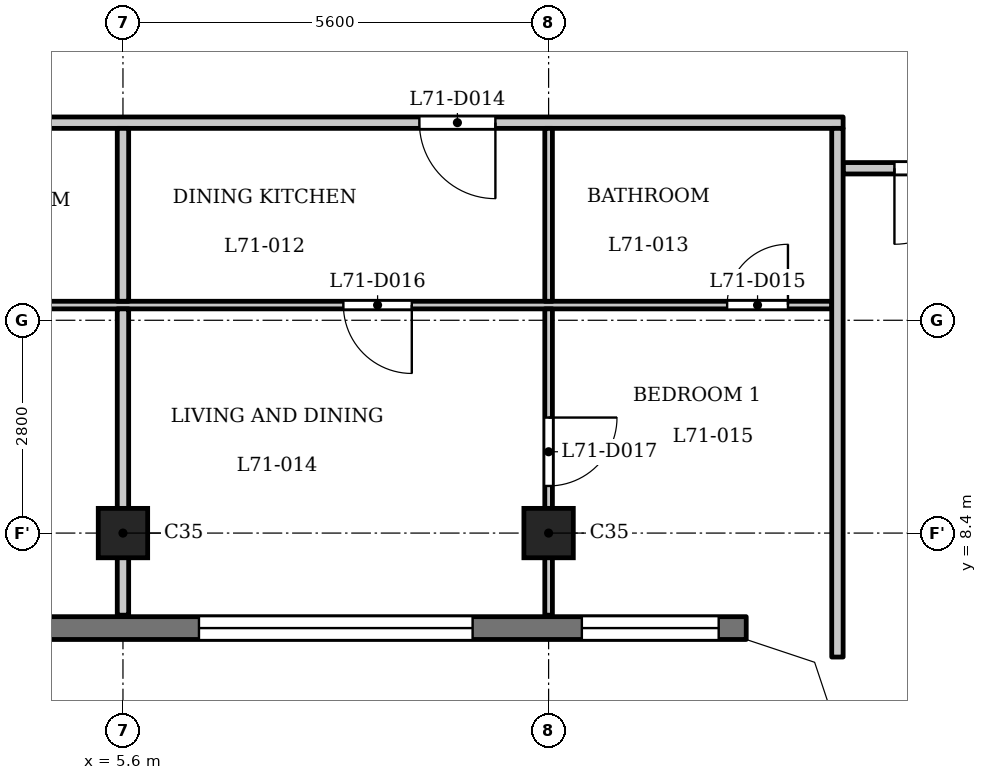
"""IFC4 building model, lengths in metres.
Left out: names, types, materials, properties, quantities, classifications, styles, units other than length and angle.
Written with IfcOpenShell. Run it as: python <this file> out.ifc"""

import sys

from ifc_helpers import new_model, si_unit, direction, frame, frame_2d, origin, origin_2d, place, context, subcontext, project, spatial, polyline, rectangle, outline, extrude, element, fill, save


model = new_model("IFC4")
c1 = context("Model", 3, precision=1e-05, world=origin(), true_north=direction((0.0, 1.0)))
c2 = subcontext(c1, "Body", "Model", "MODEL_VIEW")
j1 = project(units=[si_unit("LENGTHUNIT", "METRE"), si_unit("PLANEANGLEUNIT", "RADIAN")], contexts=[c1])
p1 = place(None, origin())
s1 = spatial("IfcSite", under=j1, at=p1, CompositionType="ELEMENT")
p2 = place(p1, origin())
s2 = spatial("IfcBuilding", under=s1, at=p2, CompositionType="ELEMENT")
p3 = place(p2, frame((0.0, 0.0, 273.2)))
s3 = spatial("IfcBuildingStorey", under=s2, at=p3, CompositionType="ELEMENT", Elevation=273.2)
for number, where, z_axis, x_axis in (
    (1, (5.6, 8.4, 0.0), (0.0, 0.0, 1.0), (1.0, 0.0, 0.0)),
    (2, (11.2, 8.4, 0.0), (0.0, 0.0, 1.0), (1.0, 0.0, 0.0)),
):
    element("IfcColumn", number, at=place(p3, frame(where, z_axis=z_axis, x_axis=x_axis)), inside=s3, PredefinedType="COLUMN", context=c2, shape_type="SweptSolid", body=[
        extrude(rectangle(XDim=0.65, YDim=0.65, at=origin_2d()), origin(), (0.0, 0.0, 1.0), 3.5),
    ])
p4 = place(p3, frame((-13.8, 7.15, 0.0), z_axis=(0.0, 0.0, 1.0), x_axis=(1.0, 0.0, 0.0)))
e3 = element("IfcWall", 3, at=p4, inside=s3, PredefinedType="SOLIDWALL", context=c2, shape_type="SweptSolid", body=[
    extrude(rectangle(XDim=27.6, YDim=0.3, at=frame_2d((13.8, 0.0))), origin(), (0.0, 0.0, 1.0), 3.2),
])
p5 = place(p4, frame((0.363, 0.0, 0.9)))
e4 = element("IfcOpeningElement", 4, at=p5, cuts=e3, PredefinedType="OPENING", context=c2, shape_type="SweptSolid", body=[
    extrude(rectangle(XDim=1.8, YDim=1.25, at=frame_2d((0.9, 0.625))), frame((0.0, 0.16, 0.0), z_axis=(0.0, -1.0, 0.0), x_axis=(1.0, 0.0, 0.0)), (0.0, 0.0, 1.0), 0.32),
])
p6 = place(p4, frame((3.6, 0.0, 1.2)))
e5 = element("IfcOpeningElement", 5, at=p6, cuts=e3, PredefinedType="OPENING", context=c2, shape_type="SweptSolid", body=[
    extrude(rectangle(XDim=3.6, YDim=0.95, at=frame_2d((1.8, 0.475))), frame((0.0, 0.16, 0.0), z_axis=(0.0, -1.0, 0.0), x_axis=(1.0, 0.0, 0.0)), (0.0, 0.0, 1.0), 0.32),
])
p7 = place(p4, frame((9.2, 0.0, 1.2)))
e6 = element("IfcOpeningElement", 6, at=p7, cuts=e3, PredefinedType="OPENING", context=c2, shape_type="SweptSolid", body=[
    extrude(rectangle(XDim=3.6, YDim=0.95, at=frame_2d((1.8, 0.475))), frame((0.0, 0.16, 0.0), z_axis=(0.0, -1.0, 0.0), x_axis=(1.0, 0.0, 0.0)), (0.0, 0.0, 1.0), 0.32),
])
p8 = place(p4, frame((14.8, 0.0, 1.2)))
e7 = element("IfcOpeningElement", 7, at=p8, cuts=e3, PredefinedType="OPENING", context=c2, shape_type="SweptSolid", body=[
    extrude(rectangle(XDim=3.6, YDim=0.95, at=frame_2d((1.8, 0.475))), frame((0.0, 0.16, 0.0), z_axis=(0.0, -1.0, 0.0), x_axis=(1.0, 0.0, 0.0)), (0.0, 0.0, 1.0), 0.32),
])
p9 = place(p4, frame((20.4, 0.0, 1.2)))
e8 = element("IfcOpeningElement", 8, at=p9, cuts=e3, PredefinedType="OPENING", context=c2, shape_type="SweptSolid", body=[
    extrude(rectangle(XDim=3.6, YDim=0.95, at=frame_2d((1.8, 0.475))), frame((0.0, 0.16, 0.0), z_axis=(0.0, -1.0, 0.0), x_axis=(1.0, 0.0, 0.0)), (0.0, 0.0, 1.0), 0.32),
])
p10 = place(p4, frame((25.438, 0.0, 0.9)))
e9 = element("IfcOpeningElement", 9, at=p10, cuts=e3, PredefinedType="OPENING", context=c2, shape_type="SweptSolid", body=[
    extrude(rectangle(XDim=1.8, YDim=1.25, at=frame_2d((0.9, 0.625))), frame((0.0, 0.16, 0.0), z_axis=(0.0, -1.0, 0.0), x_axis=(1.0, 0.0, 0.0)), (0.0, 0.0, 1.0), 0.32),
])
p11 = place(p3, frame((-14.925, 11.4, 0.0), z_axis=(0.0, 0.0, 1.0), x_axis=(1.0, 0.0, 0.0)))
e10 = element("IfcWall", 10, at=p11, inside=s3, PredefinedType="PARTITIONING", context=c2, shape_type="SweptSolid", body=[
    extrude(rectangle(XDim=29.85, YDim=0.1, at=frame_2d((14.925, 0.0))), origin(), (0.0, 0.0, 1.0), 3.2),
])
p12 = place(p11, frame((13.475, 0.0, 0.0)))
e11 = element("IfcOpeningElement", 11, at=p12, cuts=e10, PredefinedType="OPENING", context=c2, shape_type="SweptSolid", body=[
    extrude(rectangle(XDim=0.9, YDim=2.1, at=frame_2d((0.45, 1.05))), frame((0.0, 0.06, 0.0), z_axis=(0.0, -1.0, 0.0), x_axis=(1.0, 0.0, 0.0)), (0.0, 0.0, 1.0), 0.12),
])
p13 = place(p11, frame((4.625, 0.0, 0.0)))
e12 = element("IfcOpeningElement", 12, at=p13, cuts=e10, PredefinedType="OPENING", context=c2, shape_type="SweptSolid", body=[
    extrude(rectangle(XDim=0.9, YDim=2.1, at=frame_2d((0.45, 1.05))), frame((0.0, 0.06, 0.0), z_axis=(0.0, -1.0, 0.0), x_axis=(1.0, 0.0, 0.0)), (0.0, 0.0, 1.0), 0.12),
])
p14 = place(p11, frame((18.075, 0.0, 0.0)))
e13 = element("IfcOpeningElement", 13, at=p14, cuts=e10, PredefinedType="OPENING", context=c2, shape_type="SweptSolid", body=[
    extrude(rectangle(XDim=0.8, YDim=2.1, at=frame_2d((0.4, 1.05))), frame((0.0, 0.06, 0.0), z_axis=(0.0, -1.0, 0.0), x_axis=(1.0, 0.0, 0.0)), (0.0, 0.0, 1.0), 0.12),
])
p15 = place(p11, frame((15.575, 0.0, 0.0)))
e14 = element("IfcOpeningElement", 14, at=p15, cuts=e10, PredefinedType="OPENING", context=c2, shape_type="SweptSolid", body=[
    extrude(rectangle(XDim=0.9, YDim=2.1, at=frame_2d((0.45, 1.05))), frame((0.0, 0.06, 0.0), z_axis=(0.0, -1.0, 0.0), x_axis=(1.0, 0.0, 0.0)), (0.0, 0.0, 1.0), 0.12),
])
p16 = place(p11, frame((28.474, 0.0, 0.0)))
e15 = element("IfcOpeningElement", 15, at=p16, cuts=e10, PredefinedType="OPENING", context=c2, shape_type="SweptSolid", body=[
    extrude(rectangle(XDim=0.8, YDim=2.1, at=frame_2d((0.4, 1.05))), frame((0.0, 0.06, 0.0), z_axis=(0.0, -1.0, 0.0), x_axis=(1.0, 0.0, 0.0)), (0.0, 0.0, 1.0), 0.12),
])
p17 = place(p11, frame((23.425, 0.0, 0.0)))
e16 = element("IfcOpeningElement", 16, at=p17, cuts=e10, PredefinedType="OPENING", context=c2, shape_type="SweptSolid", body=[
    extrude(rectangle(XDim=0.9, YDim=2.1, at=frame_2d((0.45, 1.05))), frame((0.0, 0.06, 0.0), z_axis=(0.0, -1.0, 0.0), x_axis=(1.0, 0.0, 0.0)), (0.0, 0.0, 1.0), 0.12),
])
p18 = place(p3, frame((15.075, 13.2, 0.0), z_axis=(0.0, 0.0, 1.0), x_axis=(1.0, 0.0, 0.0)))
e17 = element("IfcWall", 17, at=p18, inside=s3, PredefinedType="PARTITIONING", context=c2, shape_type="SweptSolid", body=[
    extrude(rectangle(XDim=2.325, YDim=0.15, at=frame_2d((1.163, 0.0))), origin(), (0.0, 0.0, 1.0), 3.2),
])
p19 = place(p18, frame((0.675, 0.0, 0.0)))
e18 = element("IfcOpeningElement", 18, at=p19, cuts=e17, PredefinedType="OPENING", context=c2, shape_type="SweptSolid", body=[
    extrude(rectangle(XDim=1.0, YDim=2.1, at=frame_2d((0.5, 1.05))), frame((0.0, 0.085, 0.0), z_axis=(0.0, -1.0, 0.0), x_axis=(1.0, 0.0, 0.0)), (0.0, 0.0, 1.0), 0.17),
])
p20 = place(p3, frame((-15.075, 13.8, 0.0), z_axis=(0.0, 0.0, 1.0), x_axis=(1.0, 0.0, 0.0)))
e19 = element("IfcWall", 19, at=p20, inside=s3, PredefinedType="PARTITIONING", context=c2, shape_type="SweptSolid", body=[
    extrude(rectangle(XDim=30.15, YDim=0.15, at=frame_2d((15.075, 0.0))), origin(), (0.0, 0.0, 1.0), 3.2),
])
p21 = place(p20, frame((10.125, 0.0, 0.0)))
e20 = element("IfcOpeningElement", 20, at=p21, cuts=e19, PredefinedType="OPENING", context=c2, shape_type="SweptSolid", body=[
    extrude(rectangle(XDim=1.0, YDim=2.1, at=frame_2d((0.5, 1.05))), frame((0.0, 0.085, 0.0), z_axis=(0.0, -1.0, 0.0), x_axis=(1.0, 0.0, 0.0)), (0.0, 0.0, 1.0), 0.17),
])
p22 = place(p20, frame((15.725, 0.0, 0.0)))
e21 = element("IfcOpeningElement", 21, at=p22, cuts=e19, PredefinedType="OPENING", context=c2, shape_type="SweptSolid", body=[
    extrude(rectangle(XDim=1.0, YDim=2.1, at=frame_2d((0.5, 1.05))), frame((0.0, 0.085, 0.0), z_axis=(0.0, -1.0, 0.0), x_axis=(1.0, 0.0, 0.0)), (0.0, 0.0, 1.0), 0.17),
])
p23 = place(p20, frame((24.575, 0.0, 0.0)))
e22 = element("IfcOpeningElement", 22, at=p23, cuts=e19, PredefinedType="OPENING", context=c2, shape_type="SweptSolid", body=[
    extrude(rectangle(XDim=1.0, YDim=2.1, at=frame_2d((0.5, 1.05))), frame((0.0, 0.085, 0.0), z_axis=(0.0, -1.0, 0.0), x_axis=(1.0, 0.0, 0.0)), (0.0, 0.0, 1.0), 0.17),
])
p24 = place(p3, frame((5.6, 7.32, 0.0), z_axis=(0.0, 0.0, 1.0), x_axis=(0.0, 1.0, 0.0)))
e23 = element("IfcWall", 23, at=p24, inside=s3, PredefinedType="PARTITIONING", context=c2, shape_type="SweptSolid", body=[
    extrude(rectangle(XDim=4.03, YDim=0.15, at=frame_2d((2.015, 0.0))), origin(), (0.0, 0.0, 1.0), 3.2),
])
p25 = place(p3, frame((5.6, 11.45, 0.0), z_axis=(0.0, 0.0, 1.0), x_axis=(0.0, 1.0, 0.0)))
e24 = element("IfcWall", 24, at=p25, inside=s3, PredefinedType="PARTITIONING", context=c2, shape_type="SweptSolid", body=[
    extrude(rectangle(XDim=2.275, YDim=0.15, at=frame_2d((1.138, 0.0))), origin(), (0.0, 0.0, 1.0), 3.2),
])
p26 = place(p3, frame((11.2, 7.32, 0.0), z_axis=(0.0, 0.0, 1.0), x_axis=(0.0, 1.0, 0.0)))
e25 = element("IfcWall", 25, at=p26, inside=s3, PredefinedType="PARTITIONING", context=c2, shape_type="SweptSolid", body=[
    extrude(rectangle(XDim=4.03, YDim=0.1, at=frame_2d((2.015, 0.0))), origin(), (0.0, 0.0, 1.0), 3.2),
])
p27 = place(p26, frame((1.7, 0.0, 0.0)))
e26 = element("IfcOpeningElement", 26, at=p27, cuts=e25, PredefinedType="OPENING", context=c2, shape_type="SweptSolid", body=[
    extrude(rectangle(XDim=0.9, YDim=2.1, at=frame_2d((0.45, 1.05))), frame((0.0, 0.06, 0.0), z_axis=(0.0, -1.0, 0.0), x_axis=(1.0, 0.0, 0.0)), (0.0, 0.0, 1.0), 0.12),
])
p28 = place(p3, frame((11.2, 11.45, 0.0), z_axis=(0.0, 0.0, 1.0), x_axis=(0.0, 1.0, 0.0)))
e27 = element("IfcWall", 27, at=p28, inside=s3, PredefinedType="PARTITIONING", context=c2, shape_type="SweptSolid", body=[
    extrude(rectangle(XDim=2.275, YDim=0.1, at=frame_2d((1.138, 0.0))), origin(), (0.0, 0.0, 1.0), 3.2),
])
p29 = place(p3, frame((15.0, 6.769, 0.0), z_axis=(0.0, 0.0, 1.0), x_axis=(0.0, 1.0, 0.0)))
e28 = element("IfcWall", 28, at=p29, inside=s3, PredefinedType="PARTITIONING", context=c2, shape_type="SweptSolid", body=[
    extrude(rectangle(XDim=6.956, YDim=0.15, at=frame_2d((3.478, 0.0))), origin(), (0.0, 0.0, 1.0), 3.2),
])
p30 = place(p3, origin())
e29 = element("IfcWall", 29, at=p30, inside=s3, PredefinedType="SOLIDWALL", context=c2, shape_type="SweptSolid", body=[
    extrude(outline(polyline([(14.937, 6.937), (13.849, 7.3), (13.8, 7.3), (13.8, 7.0), (14.7, 6.7), (15.0, 5.8), (15.3, 5.8), (15.3, 5.849), (14.937, 6.937)])), origin(), (0.0, 0.0, 1.0), 3.2),
])
p31 = place(p19, origin())
e30 = element("IfcDoor", 30, at=p31, inside=s3, OperationType="SINGLE_SWING_LEFT", PredefinedType="DOOR", context=c2, shape_type="SweptSolid", body=[
    extrude(rectangle(XDim=1.0, YDim=2.1, at=frame_2d((0.5, 1.05))), frame((0.0, 0.025, 0.0), z_axis=(0.0, -1.0, 0.0), x_axis=(1.0, 0.0, 0.0)), (0.0, 0.0, 1.0), 0.05),
])
fill(e18, e30)
p32 = place(p23, origin())
e31 = element("IfcDoor", 31, at=p32, inside=s3, OperationType="SINGLE_SWING_RIGHT", PredefinedType="DOOR", context=c2, shape_type="SweptSolid", body=[
    extrude(rectangle(XDim=1.0, YDim=2.1, at=frame_2d((0.5, 1.05))), frame((0.0, 0.025, 0.0), z_axis=(0.0, -1.0, 0.0), x_axis=(1.0, 0.0, 0.0)), (0.0, 0.0, 1.0), 0.05),
])
fill(e22, e31)
p33 = place(p16, origin())
e32 = element("IfcDoor", 32, at=p33, inside=s3, OperationType="SINGLE_SWING_LEFT", PredefinedType="DOOR", context=c2, shape_type="SweptSolid", body=[
    extrude(rectangle(XDim=0.8, YDim=2.1, at=frame_2d((0.4, 1.05))), frame((0.0, 0.025, 0.0), z_axis=(0.0, -1.0, 0.0), x_axis=(1.0, 0.0, 0.0)), (0.0, 0.0, 1.0), 0.05),
])
fill(e15, e32)
p34 = place(p17, origin())
e33 = element("IfcDoor", 33, at=p34, inside=s3, OperationType="SINGLE_SWING_RIGHT", PredefinedType="DOOR", context=c2, shape_type="SweptSolid", body=[
    extrude(rectangle(XDim=0.9, YDim=2.1, at=frame_2d((0.45, 1.05))), frame((0.0, 0.025, 0.0), z_axis=(0.0, -1.0, 0.0), x_axis=(1.0, 0.0, 0.0)), (0.0, 0.0, 1.0), 0.05),
])
fill(e16, e33)
p35 = place(p27, origin())
e34 = element("IfcDoor", 34, at=p35, inside=s3, OperationType="SINGLE_SWING_RIGHT", PredefinedType="DOOR", context=c2, shape_type="SweptSolid", body=[
    extrude(rectangle(XDim=0.9, YDim=2.1, at=frame_2d((0.45, 1.05))), frame((0.0, 0.025, 0.0), z_axis=(0.0, -1.0, 0.0), x_axis=(1.0, 0.0, 0.0)), (0.0, 0.0, 1.0), 0.05),
])
fill(e26, e34)
p36 = place(p9, origin())
e35 = element("IfcWindow", 35, at=p36, inside=s3, PartitioningType="SINGLE_PANEL", PredefinedType="WINDOW", context=c2, shape_type="SweptSolid", body=[
    extrude(rectangle(XDim=3.6, YDim=0.95, at=frame_2d((1.8, 0.475))), frame((0.0, 0.03, 0.0), z_axis=(0.0, -1.0, 0.0), x_axis=(1.0, 0.0, 0.0)), (0.0, 0.0, 1.0), 0.06),
])
fill(e8, e35)
p37 = place(p10, origin())
e36 = element("IfcWindow", 36, at=p37, inside=s3, PartitioningType="SINGLE_PANEL", PredefinedType="WINDOW", context=c2, shape_type="SweptSolid", body=[
    extrude(rectangle(XDim=1.8, YDim=1.25, at=frame_2d((0.9, 0.625))), frame((0.0, 0.03, 0.0), z_axis=(0.0, -1.0, 0.0), x_axis=(1.0, 0.0, 0.0)), (0.0, 0.0, 1.0), 0.06),
])
fill(e9, e36)
save(model, sys.argv[1])
